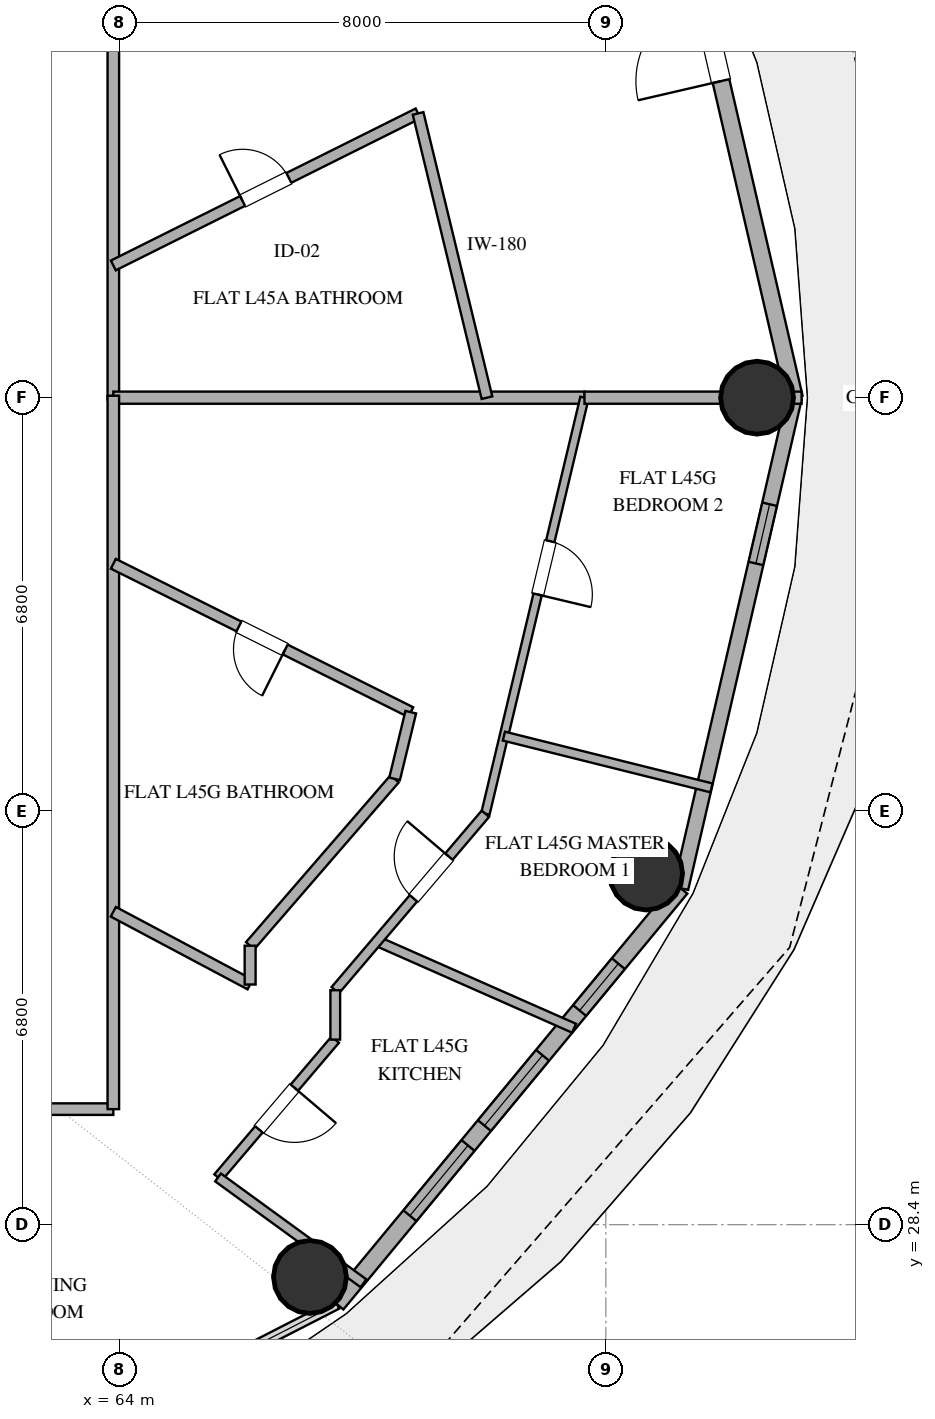
"""IFC4 building model, lengths in metres.
Left out: names, types, materials, properties, quantities, classifications, styles, units other than length and angle.
Written with IfcOpenShell. Run it as: python <this file> out.ifc"""

import sys

from ifc_helpers import new_model, si_unit, direction, frame, frame_2d, origin, origin_2d, place, context, subcontext, project, spatial, rectangle, hollow_circle, extrude, element, fill, save


model = new_model("IFC4")
c1 = context("Model", 3, precision=1e-05, world=origin(), true_north=direction((0.0, 1.0)))
c2 = subcontext(c1, "Body", "Model", "MODEL_VIEW")
j1 = project(units=[si_unit("LENGTHUNIT", "METRE"), si_unit("PLANEANGLEUNIT", "RADIAN")], contexts=[c1])
p1 = place(None, origin())
s1 = spatial("IfcSite", under=j1, at=p1, CompositionType="ELEMENT")
p2 = place(p1, origin())
s2 = spatial("IfcBuilding", under=s1, at=p2, CompositionType="ELEMENT")
p3 = place(p2, frame((0.0, 0.0, 179.4)))
s3 = spatial("IfcBuildingStorey", under=s2, at=p3, CompositionType="ELEMENT", Elevation=179.4)
for number, where, z_axis, x_axis in (
    (1, (74.487, 42.0, 0.0), (0.0, 0.0, 1.0), (1.0, 0.0, 0.0)),
    (2, (67.134, 27.54, 0.0), (0.0, 0.0, 1.0), (1.0, 0.0, 0.0)),
    (3, (72.662, 34.174, 0.0), (0.0, 0.0, 1.0), (1.0, 0.0, 0.0)),
):
    element("IfcColumn", number, at=place(p3, frame(where, z_axis=z_axis, x_axis=x_axis)), inside=s3, PredefinedType="COLUMN", context=c2, shape_type="SweptSolid", body=[
        extrude(hollow_circle(Radius=0.6, WallThickness=0.032, at=origin_2d()), origin(), (0.0, 0.0, 1.0), 3.38),
    ])
p4 = place(p3, frame((75.099, 42.0, 0.0), z_axis=(0.0, 0.0, 1.0), x_axis=(-0.225473184558, 0.974249374157, 0.0)))
e4 = element("IfcWall", 4, at=p4, inside=s3, PredefinedType="SOLIDWALL", context=c2, shape_type="SweptSolid", body=[
    extrude(rectangle(XDim=8.28, YDim=0.28, at=frame_2d((4.14, 0.0))), origin(), (0.0, 0.0, 1.0), 3.38),
])
p5 = place(p4, frame((5.344, 0.0, 0.0)))
e5 = element("IfcOpeningElement", 5, at=p5, cuts=e4, PredefinedType="OPENING", context=c2, shape_type="SweptSolid", body=[
    extrude(rectangle(XDim=1.4, YDim=2.2, at=frame_2d((0.7, 1.1))), frame((0.0, 0.15, 0.0), z_axis=(0.0, -1.0, 0.0), x_axis=(1.0, 0.0, 0.0)), (0.0, 0.0, 1.0), 0.3),
])
p6 = place(p3, frame((67.576, 27.094, 0.0), z_axis=(0.0, 0.0, 1.0), x_axis=(0.637333477683, 0.770588111915, 0.0)))
e6 = element("IfcWall", 6, at=p6, inside=s3, PredefinedType="SOLIDWALL", context=c2, shape_type="SweptSolid", body=[
    extrude(rectangle(XDim=8.875, YDim=0.28, at=frame_2d((4.438, 0.0))), origin(), (0.0, 0.0, 1.0), 3.38),
])
p7 = place(p6, frame((1.885, 0.0, 0.85)))
e7 = element("IfcOpeningElement", 7, at=p7, cuts=e6, PredefinedType="OPENING", context=c2, shape_type="SweptSolid", body=[
    extrude(rectangle(XDim=1.5, YDim=1.8, at=frame_2d((0.75, 0.9))), frame((0.0, 0.15, 0.0), z_axis=(0.0, -1.0, 0.0), x_axis=(1.0, 0.0, 0.0)), (0.0, 0.0, 1.0), 0.3),
])
p8 = place(p6, frame((3.809, 0.0, 0.85)))
e8 = element("IfcOpeningElement", 8, at=p8, cuts=e6, PredefinedType="OPENING", context=c2, shape_type="SweptSolid", body=[
    extrude(rectangle(XDim=1.5, YDim=1.8, at=frame_2d((0.75, 0.9))), frame((0.0, 0.15, 0.0), z_axis=(0.0, -1.0, 0.0), x_axis=(1.0, 0.0, 0.0)), (0.0, 0.0, 1.0), 0.3),
])
p9 = place(p6, frame((6.265, 0.0, 0.85)))
e9 = element("IfcOpeningElement", 9, at=p9, cuts=e6, PredefinedType="OPENING", context=c2, shape_type="SweptSolid", body=[
    extrude(rectangle(XDim=1.0, YDim=1.8, at=frame_2d((0.5, 0.9))), frame((0.0, 0.15, 0.0), z_axis=(0.0, -1.0, 0.0), x_axis=(1.0, 0.0, 0.0)), (0.0, 0.0, 1.0), 0.3),
])
p10 = place(p3, frame((73.232, 33.933, 0.0), z_axis=(0.0, 0.0, 1.0), x_axis=(0.225473184558, 0.974249374157, 0.0)))
e10 = element("IfcWall", 10, at=p10, inside=s3, PredefinedType="SOLIDWALL", context=c2, shape_type="SweptSolid", body=[
    extrude(rectangle(XDim=8.28, YDim=0.25, at=frame_2d((4.14, 0.0))), origin(), (0.0, 0.0, 1.0), 3.38),
])
p11 = place(p10, frame((5.481, 0.0, 1.42)))
e11 = element("IfcOpeningElement", 11, at=p11, cuts=e10, PredefinedType="OPENING", context=c2, shape_type="SweptSolid", body=[
    extrude(rectangle(XDim=1.0, YDim=1.05, at=frame_2d((0.5, 0.525))), frame((0.0, 0.135, 0.0), z_axis=(0.0, -1.0, 0.0), x_axis=(1.0, 0.0, 0.0)), (0.0, 0.0, 1.0), 0.27),
])
p12 = place(p3, frame((44.873, 30.3, 0.0), z_axis=(0.0, 0.0, 1.0), x_axis=(1.0, 0.0, 0.0)))
e12 = element("IfcWall", 12, at=p12, inside=s3, PredefinedType="PARTITIONING", context=c2, shape_type="SweptSolid", body=[
    extrude(rectangle(XDim=19.027, YDim=0.19, at=frame_2d((9.514, 0.0))), origin(), (0.0, 0.0, 1.0), 2.74),
])
p13 = place(p12, frame((5.01, 0.0, 0.0)))
e13 = element("IfcOpeningElement", 13, at=p13, cuts=e12, PredefinedType="OPENING", context=c2, shape_type="SweptSolid", body=[
    extrude(rectangle(XDim=1.0, YDim=2.2, at=frame_2d((0.5, 1.1))), frame((0.0, 0.105, 0.0), z_axis=(0.0, -1.0, 0.0), x_axis=(1.0, 0.0, 0.0)), (0.0, 0.0, 1.0), 0.21),
])
p14 = place(p12, frame((14.504, 0.0, 0.0)))
e14 = element("IfcOpeningElement", 14, at=p14, cuts=e12, PredefinedType="OPENING", context=c2, shape_type="SweptSolid", body=[
    extrude(rectangle(XDim=1.0, YDim=2.2, at=frame_2d((0.5, 1.1))), frame((0.0, 0.105, 0.0), z_axis=(0.0, -1.0, 0.0), x_axis=(1.0, 0.0, 0.0)), (0.0, 0.0, 1.0), 0.21),
])
p15 = place(p3, frame((63.9, 53.7, 0.0), z_axis=(0.0, 0.0, 1.0), x_axis=(0.0, -1.0, 0.0)))
e15 = element("IfcWall", 15, at=p15, inside=s3, PredefinedType="PARTITIONING", context=c2, shape_type="SweptSolid", body=[
    extrude(rectangle(XDim=11.732, YDim=0.19, at=frame_2d((5.866, 0.0))), origin(), (0.0, 0.0, 1.0), 2.74),
])
p16 = place(p15, frame((4.281, 0.0, 0.0)))
e16 = element("IfcOpeningElement", 16, at=p16, cuts=e15, PredefinedType="OPENING", context=c2, shape_type="SweptSolid", body=[
    extrude(rectangle(XDim=1.0, YDim=2.2, at=frame_2d((0.5, 1.1))), frame((0.0, 0.105, 0.0), z_axis=(0.0, -1.0, 0.0), x_axis=(1.0, 0.0, 0.0)), (0.0, 0.0, 1.0), 0.21),
])
p17 = place(p3, frame((63.9, 42.0, 0.0), z_axis=(0.0, 0.0, 1.0), x_axis=(1.0, 0.0, 0.0)))
e17 = element("IfcWall", 17, at=p17, inside=s3, PredefinedType="PARTITIONING", context=c2, shape_type="SweptSolid", body=[
    extrude(rectangle(XDim=7.749, YDim=0.2, at=frame_2d((3.875, 0.0))), origin(), (0.0, 0.0, 1.0), 2.74),
])
p18 = place(p3, frame((63.9, 42.032, 0.0), z_axis=(0.0, 0.0, 1.0), x_axis=(0.0, -1.0, 0.0)))
e18 = element("IfcWall", 18, at=p18, inside=s3, PredefinedType="PARTITIONING", context=c2, shape_type="SweptSolid", body=[
    extrude(rectangle(XDim=11.732, YDim=0.19, at=frame_2d((5.866, 0.0))), origin(), (0.0, 0.0, 1.0), 2.74),
])
p19 = place(p3, frame((71.649, 42.0, 0.0), z_axis=(0.0, 0.0, 1.0), x_axis=(-0.231658068135, -0.972797275627, 0.0)))
e19 = element("IfcWall", 19, at=p19, inside=s3, PredefinedType="PARTITIONING", context=c2, shape_type="SweptSolid", body=[
    extrude(rectangle(XDim=7.034, YDim=0.14, at=frame_2d((3.517, 0.0))), origin(), (0.0, 0.0, 1.0), 2.74),
])
p20 = place(p19, frame((2.427, 0.0, 0.0)))
e20 = element("IfcOpeningElement", 20, at=p20, cuts=e19, PredefinedType="OPENING", context=c2, shape_type="SweptSolid", body=[
    extrude(rectangle(XDim=0.9, YDim=2.1, at=frame_2d((0.45, 1.05))), frame((0.0, 0.08, 0.0), z_axis=(0.0, -1.0, 0.0), x_axis=(1.0, 0.0, 0.0)), (0.0, 0.0, 1.0), 0.16),
])
p21 = place(p3, frame((63.9, 44.175, 0.0), z_axis=(0.0, 0.0, 1.0), x_axis=(0.894853920946, 0.446359115699, 0.0)))
e21 = element("IfcWall", 21, at=p21, inside=s3, PredefinedType="PLUMBINGWALL", context=c2, shape_type="SweptSolid", body=[
    extrude(rectangle(XDim=5.601, YDim=0.18, at=frame_2d((2.801, 0.0))), origin(), (0.0, 0.0, 1.0), 2.74),
])
p22 = place(p21, frame((2.375, 0.0, 0.0)))
e22 = element("IfcOpeningElement", 22, at=p22, cuts=e21, PredefinedType="OPENING", context=c2, shape_type="SweptSolid", body=[
    extrude(rectangle(XDim=0.85, YDim=2.1, at=frame_2d((0.425, 1.05))), frame((0.0, 0.1, 0.0), z_axis=(0.0, -1.0, 0.0), x_axis=(1.0, 0.0, 0.0)), (0.0, 0.0, 1.0), 0.2),
])
p23 = place(p3, frame((68.792, 36.828, 0.0), z_axis=(0.0, 0.0, 1.0), x_axis=(-0.894873333185, 0.44632019622, 0.0)))
e23 = element("IfcWall", 23, at=p23, inside=s3, PredefinedType="PLUMBINGWALL", context=c2, shape_type="SweptSolid", body=[
    extrude(rectangle(XDim=5.467, YDim=0.18, at=frame_2d((2.733, 0.0))), origin(), (0.0, 0.0, 1.0), 2.74),
])
p24 = place(p23, frame((2.308, 0.0, 0.0)))
e24 = element("IfcOpeningElement", 24, at=p24, cuts=e23, PredefinedType="OPENING", context=c2, shape_type="SweptSolid", body=[
    extrude(rectangle(XDim=0.85, YDim=2.1, at=frame_2d((0.425, 1.05))), frame((0.0, 0.1, 0.0), z_axis=(0.0, -1.0, 0.0), x_axis=(1.0, 0.0, 0.0)), (0.0, 0.0, 1.0), 0.2),
])
p25 = place(p3, frame((68.912, 46.675, 0.0), z_axis=(0.0, 0.0, 1.0), x_axis=(0.235459111302, -0.97188425592, 0.0)))
e25 = element("IfcWall", 25, at=p25, inside=s3, PredefinedType="PLUMBINGWALL", context=c2, shape_type="SweptSolid", body=[
    extrude(rectangle(XDim=4.81, YDim=0.18, at=frame_2d((2.405, 0.0))), origin(), (0.0, 0.0, 1.0), 2.74),
])
p26 = place(p3, frame((66.15, 32.987, 0.0), z_axis=(0.0, 0.0, 1.0), x_axis=(0.654577130551, 0.755995224958, 0.0)))
e26 = element("IfcWall", 26, at=p26, inside=s3, PredefinedType="PLUMBINGWALL", context=c2, shape_type="SweptSolid", body=[
    extrude(rectangle(XDim=3.63, YDim=0.18, at=frame_2d((1.815, 0.0))), origin(), (0.0, 0.0, 1.0), 2.74),
])
p27 = place(p3, frame((71.649, 42.0, 0.0), z_axis=(0.0, 0.0, 1.0), x_axis=(1.0, 0.0, 0.0)))
e27 = element("IfcWall", 27, at=p27, inside=s3, PredefinedType="PARTITIONING", context=c2, shape_type="SweptSolid", body=[
    extrude(rectangle(XDim=3.571, YDim=0.2, at=frame_2d((1.785, 0.0))), origin(), (0.0, 0.0, 1.0), 2.74),
])
p28 = place(p3, frame((71.478, 31.63, 0.0), z_axis=(0.0, 0.0, 1.0), x_axis=(-0.914752340799, 0.40401504304, 0.0)))
e28 = element("IfcWall", 28, at=p28, inside=s3, PredefinedType="PLUMBINGWALL", context=c2, shape_type="SweptSolid", body=[
    extrude(rectangle(XDim=3.543, YDim=0.16, at=frame_2d((1.772, 0.0))), origin(), (0.0, 0.0, 1.0), 2.74),
])
p29 = place(p3, frame((70.323, 36.434, 0.0), z_axis=(0.0, 0.0, 1.0), x_axis=(0.970301483456, -0.241898803642, 0.0)))
e29 = element("IfcWall", 29, at=p29, inside=s3, PredefinedType="PARTITIONING", context=c2, shape_type="SweptSolid", body=[
    extrude(rectangle(XDim=3.518, YDim=0.15, at=frame_2d((1.759, 0.0))), origin(), (0.0, 0.0, 1.0), 2.74),
])
p30 = place(p3, frame((67.55, 31.443, 0.0), z_axis=(0.0, 0.0, 1.0), x_axis=(-0.647915118337, -0.761712543832, 0.0)))
e30 = element("IfcWall", 30, at=p30, inside=s3, PredefinedType="PLUMBINGWALL", context=c2, shape_type="SweptSolid", body=[
    extrude(rectangle(XDim=2.976, YDim=0.16, at=frame_2d((1.488, 0.0))), origin(), (0.0, 0.0, 1.0), 2.74),
])
p31 = place(p30, frame((1.038, 0.0, 0.0)))
e31 = element("IfcOpeningElement", 31, at=p31, cuts=e30, PredefinedType="OPENING", context=c2, shape_type="SweptSolid", body=[
    extrude(rectangle(XDim=0.9, YDim=2.1, at=frame_2d((0.45, 1.05))), frame((0.0, 0.09, 0.0), z_axis=(0.0, -1.0, 0.0), x_axis=(1.0, 0.0, 0.0)), (0.0, 0.0, 1.0), 0.18),
])
p32 = place(p3, frame((65.622, 29.177, 0.0), z_axis=(0.0, 0.0, 1.0), x_axis=(0.808600464561, -0.588358129638, 0.0)))
e32 = element("IfcWall", 32, at=p32, inside=s3, PredefinedType="PLUMBINGWALL", context=c2, shape_type="SweptSolid", body=[
    extrude(rectangle(XDim=2.958, YDim=0.16, at=frame_2d((1.479, 0.0))), origin(), (0.0, 0.0, 1.0), 2.74),
])
p33 = place(p3, frame((67.55, 32.256, 0.0), z_axis=(0.0, 0.0, 1.0), x_axis=(0.648059335437, 0.761589848773, 0.0)))
e33 = element("IfcWall", 33, at=p33, inside=s3, PredefinedType="PLUMBINGWALL", context=c2, shape_type="SweptSolid", body=[
    extrude(rectangle(XDim=3.811, YDim=0.16, at=frame_2d((1.905, 0.0))), origin(), (0.0, 0.0, 1.0), 2.74),
])
p34 = place(p33, frame((1.985, 0.0, 0.0)))
e34 = element("IfcOpeningElement", 34, at=p34, cuts=e33, PredefinedType="OPENING", context=c2, shape_type="SweptSolid", body=[
    extrude(rectangle(XDim=0.9, YDim=2.1, at=frame_2d((0.45, 1.05))), frame((0.0, 0.09, 0.0), z_axis=(0.0, -1.0, 0.0), x_axis=(1.0, 0.0, 0.0)), (0.0, 0.0, 1.0), 0.18),
])
p35 = place(p3, frame((63.9, 33.546, 0.0), z_axis=(0.0, 0.0, 1.0), x_axis=(0.882956890564, -0.469454075929, 0.0)))
e35 = element("IfcWall", 35, at=p35, inside=s3, PredefinedType="PLUMBINGWALL", context=c2, shape_type="SweptSolid", body=[
    extrude(rectangle(XDim=2.548, YDim=0.18, at=frame_2d((1.274, 0.0))), origin(), (0.0, 0.0, 1.0), 2.74),
])
p36 = place(p3, frame((68.526, 35.732, 0.0), z_axis=(0.0, 0.0, 1.0), x_axis=(0.235606217796, 0.971848604535, 0.0)))
e36 = element("IfcWall", 36, at=p36, inside=s3, PredefinedType="PLUMBINGWALL", context=c2, shape_type="SweptSolid", body=[
    extrude(rectangle(XDim=1.128, YDim=0.18, at=frame_2d((0.564, 0.0))), origin(), (0.0, 0.0, 1.0), 2.74),
])
p37 = place(p3, frame((67.55, 32.256, 0.0), z_axis=(0.0, 0.0, 1.0), x_axis=(0.0, -1.0, 0.0)))
e37 = element("IfcWall", 37, at=p37, inside=s3, PredefinedType="PLUMBINGWALL", context=c2, shape_type="SweptSolid", body=[
    extrude(rectangle(XDim=0.812, YDim=0.16, at=frame_2d((0.406, 0.0))), origin(), (0.0, 0.0, 1.0), 2.74),
])
p38 = place(p3, frame((66.15, 32.35, 0.0), z_axis=(0.0, 0.0, 1.0), x_axis=(0.0, 1.0, 0.0)))
e38 = element("IfcWall", 38, at=p38, inside=s3, PredefinedType="PLUMBINGWALL", context=c2, shape_type="SweptSolid", body=[
    extrude(rectangle(XDim=0.638, YDim=0.18, at=frame_2d((0.319, 0.0))), origin(), (0.0, 0.0, 1.0), 2.74),
])
p39 = place(p5, origin())
e39 = element("IfcDoor", 39, at=p39, inside=s3, OperationType="SINGLE_SWING_LEFT", PredefinedType="DOOR", context=c2, shape_type="SweptSolid", body=[
    extrude(rectangle(XDim=1.4, YDim=2.2, at=frame_2d((0.7, 1.1))), frame((0.0, 0.025, 0.0), z_axis=(0.0, -1.0, 0.0), x_axis=(1.0, 0.0, 0.0)), (0.0, 0.0, 1.0), 0.05),
])
fill(e5, e39)
p40 = place(p7, origin())
e40 = element("IfcWindow", 40, at=p40, inside=s3, PartitioningType="SINGLE_PANEL", PredefinedType="WINDOW", context=c2, shape_type="SweptSolid", body=[
    extrude(rectangle(XDim=1.5, YDim=1.8, at=frame_2d((0.75, 0.9))), frame((0.0, 0.03, 0.0), z_axis=(0.0, -1.0, 0.0), x_axis=(1.0, 0.0, 0.0)), (0.0, 0.0, 1.0), 0.06),
])
fill(e7, e40)
p41 = place(p8, origin())
e41 = element("IfcWindow", 41, at=p41, inside=s3, PartitioningType="SINGLE_PANEL", PredefinedType="WINDOW", context=c2, shape_type="SweptSolid", body=[
    extrude(rectangle(XDim=1.5, YDim=1.8, at=frame_2d((0.75, 0.9))), frame((0.0, 0.03, 0.0), z_axis=(0.0, -1.0, 0.0), x_axis=(1.0, 0.0, 0.0)), (0.0, 0.0, 1.0), 0.06),
])
fill(e8, e41)
p42 = place(p9, origin())
e42 = element("IfcWindow", 42, at=p42, inside=s3, PartitioningType="SINGLE_PANEL", PredefinedType="WINDOW", context=c2, shape_type="SweptSolid", body=[
    extrude(rectangle(XDim=1.0, YDim=1.8, at=frame_2d((0.5, 0.9))), frame((0.0, 0.03, 0.0), z_axis=(0.0, -1.0, 0.0), x_axis=(1.0, 0.0, 0.0)), (0.0, 0.0, 1.0), 0.06),
])
fill(e9, e42)
p43 = place(p11, origin())
e43 = element("IfcWindow", 43, at=p43, inside=s3, PartitioningType="SINGLE_PANEL", PredefinedType="WINDOW", context=c2, shape_type="SweptSolid", body=[
    extrude(rectangle(XDim=1.0, YDim=1.05, at=frame_2d((0.5, 0.525))), frame((0.0, 0.03, 0.0), z_axis=(0.0, -1.0, 0.0), x_axis=(1.0, 0.0, 0.0)), (0.0, 0.0, 1.0), 0.06),
])
fill(e11, e43)
p44 = place(p20, origin())
e44 = element("IfcDoor", 44, at=p44, inside=s3, OperationType="SINGLE_SWING_RIGHT", PredefinedType="DOOR", context=c2, shape_type="SweptSolid", body=[
    extrude(rectangle(XDim=0.9, YDim=2.1, at=frame_2d((0.45, 1.05))), frame((0.0, 0.025, 0.0), z_axis=(0.0, -1.0, 0.0), x_axis=(1.0, 0.0, 0.0)), (0.0, 0.0, 1.0), 0.05),
])
fill(e20, e44)
p45 = place(p22, origin())
e45 = element("IfcDoor", 45, at=p45, inside=s3, OperationType="SINGLE_SWING_LEFT", PredefinedType="DOOR", context=c2, shape_type="SweptSolid", body=[
    extrude(rectangle(XDim=0.85, YDim=2.1, at=frame_2d((0.425, 1.05))), frame((0.0, 0.025, 0.0), z_axis=(0.0, -1.0, 0.0), x_axis=(1.0, 0.0, 0.0)), (0.0, 0.0, 1.0), 0.05),
])
fill(e22, e45)
p46 = place(p24, origin())
e46 = element("IfcDoor", 46, at=p46, inside=s3, OperationType="SINGLE_SWING_LEFT", PredefinedType="DOOR", context=c2, shape_type="SweptSolid", body=[
    extrude(rectangle(XDim=0.85, YDim=2.1, at=frame_2d((0.425, 1.05))), frame((0.0, 0.025, 0.0), z_axis=(0.0, -1.0, 0.0), x_axis=(1.0, 0.0, 0.0)), (0.0, 0.0, 1.0), 0.05),
])
fill(e24, e46)
p47 = place(p31, origin())
e47 = element("IfcDoor", 47, at=p47, inside=s3, OperationType="SINGLE_SWING_LEFT", PredefinedType="DOOR", context=c2, shape_type="SweptSolid", body=[
    extrude(rectangle(XDim=0.9, YDim=2.1, at=frame_2d((0.45, 1.05))), frame((0.0, 0.025, 0.0), z_axis=(0.0, -1.0, 0.0), x_axis=(1.0, 0.0, 0.0)), (0.0, 0.0, 1.0), 0.05),
])
fill(e31, e47)
p48 = place(p34, origin())
e48 = element("IfcDoor", 48, at=p48, inside=s3, OperationType="SINGLE_SWING_RIGHT", PredefinedType="DOOR", context=c2, shape_type="SweptSolid", body=[
    extrude(rectangle(XDim=0.9, YDim=2.1, at=frame_2d((0.45, 1.05))), frame((0.0, 0.025, 0.0), z_axis=(0.0, -1.0, 0.0), x_axis=(1.0, 0.0, 0.0)), (0.0, 0.0, 1.0), 0.05),
])
fill(e34, e48)
save(model, sys.argv[1])
